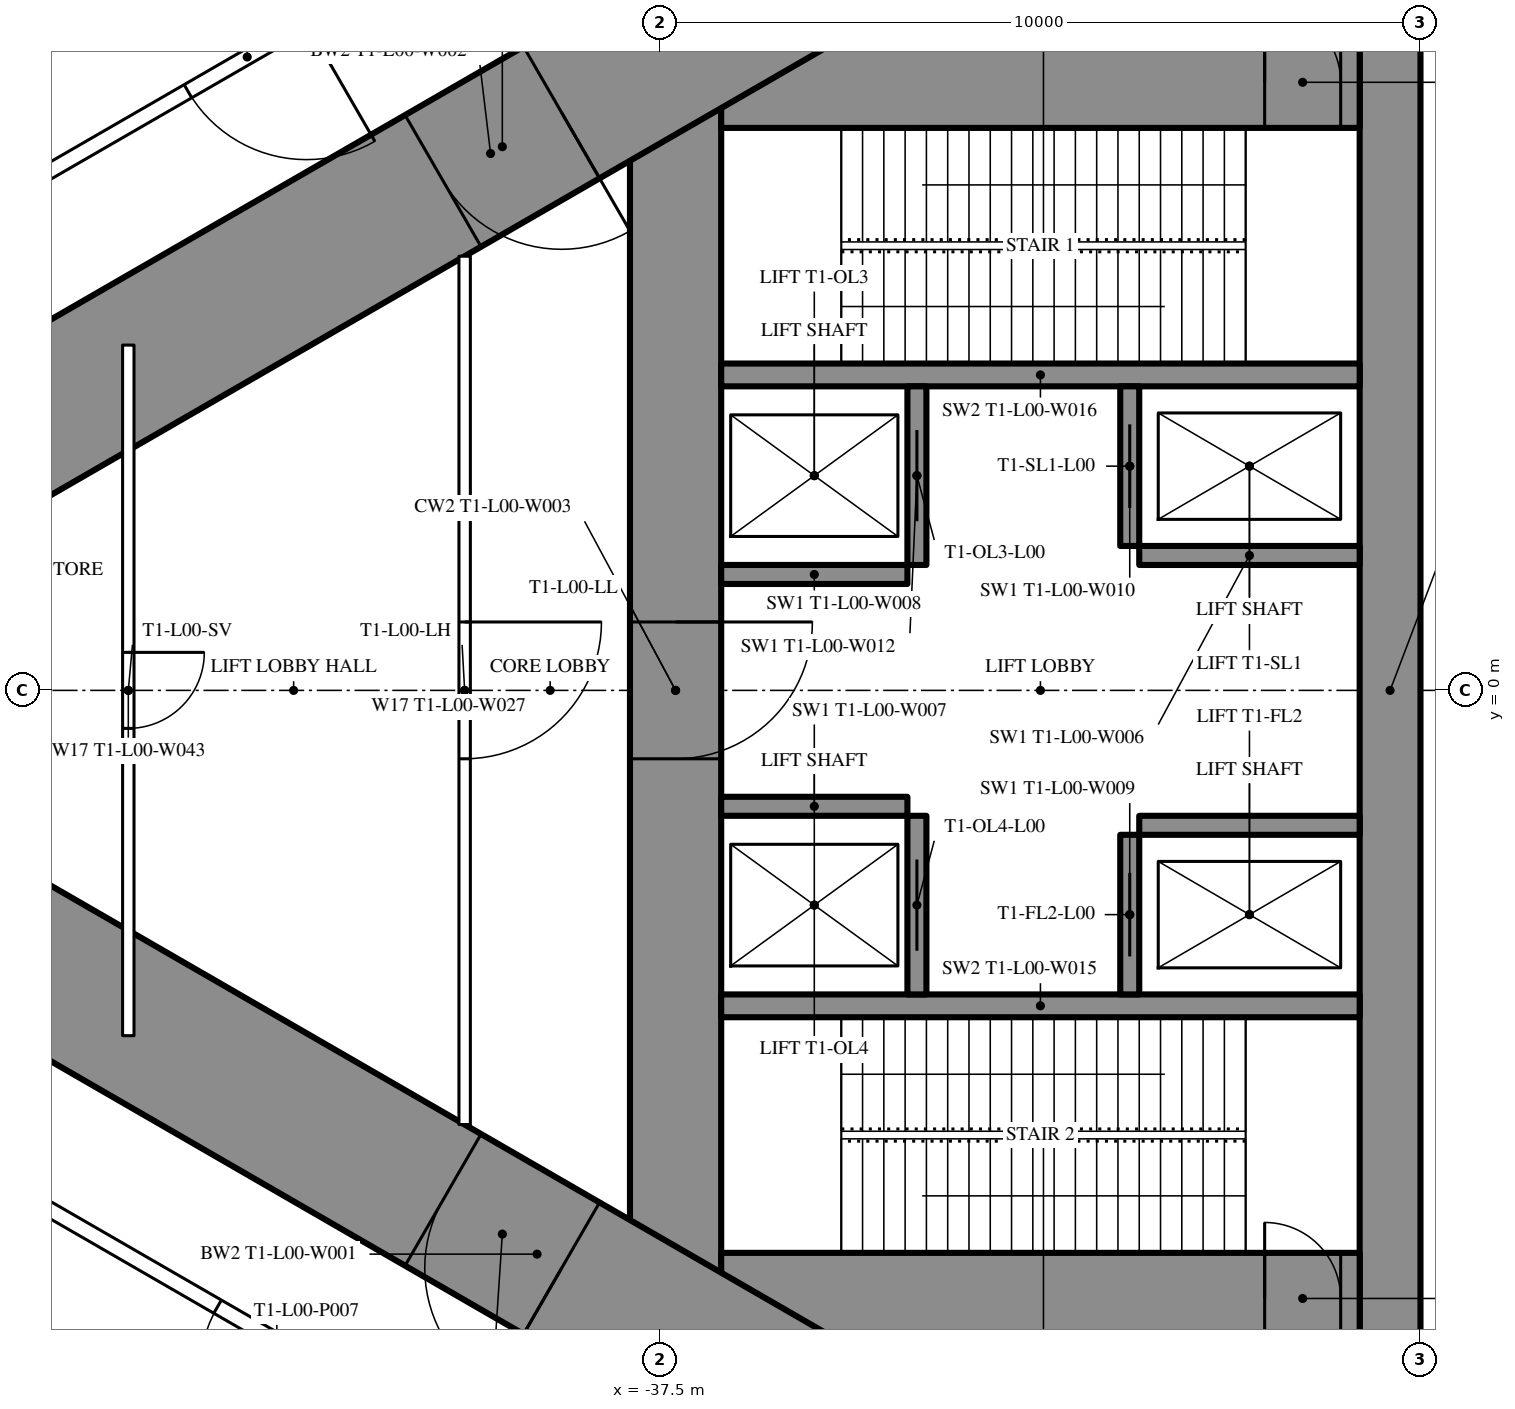
"""IFC4 building model, lengths in metres.
Left out: names, types, materials, properties, quantities, classifications, styles, units other than length and angle.
Written with IfcOpenShell. Run it as: python <this file> out.ifc"""

import sys

from ifc_helpers import new_model, si_unit, direction, frame, frame_2d, origin, place, context, subcontext, project, spatial, rectangle, extrude, element, fill, save


model = new_model("IFC4")
c1 = context("Model", 3, precision=1e-05, world=origin(), true_north=direction((0.0, 1.0)))
c2 = subcontext(c1, "Body", "Model", "MODEL_VIEW")
j1 = project(units=[si_unit("LENGTHUNIT", "METRE"), si_unit("PLANEANGLEUNIT", "RADIAN")], contexts=[c1])
p1 = place(None, origin())
s1 = spatial("IfcSite", under=j1, at=p1, CompositionType="ELEMENT")
p2 = place(p1, origin())
s2 = spatial("IfcBuilding", under=s1, at=p2, CompositionType="ELEMENT")
p3 = place(p2, origin())
s3 = spatial("IfcBuildingStorey", under=s2, at=p3, CompositionType="ELEMENT", Elevation=0.0)
p4 = place(p3, frame((-27.9, 8.6, 0.0), z_axis=(0.0, 0.0, 1.0), x_axis=(0.0, -1.0, 0.0)))
e1 = element("IfcWall", 1, at=p4, inside=s3, PredefinedType="SHEAR", context=c2, shape_type="SweptSolid", body=[
    extrude(rectangle(XDim=17.2, YDim=0.8, at=frame_2d((8.6, 0.0))), origin(), (0.0, 0.0, 1.0), 7.2),
])
p5 = place(p3, frame((-37.3, 8.6, 0.0), z_axis=(0.0, 0.0, 1.0), x_axis=(0.0, -1.0, 0.0)))
e2 = element("IfcWall", 2, at=p5, inside=s3, PredefinedType="SHEAR", context=c2, shape_type="SweptSolid", body=[
    extrude(rectangle(XDim=17.2, YDim=1.2, at=frame_2d((8.6, 0.0))), origin(), (0.0, 0.0, 1.0), 7.2),
])
p6 = place(p5, frame((7.7, 0.0, 0.0)))
e3 = element("IfcOpeningElement", 3, at=p6, cuts=e2, PredefinedType="OPENING", context=c2, shape_type="SweptSolid", body=[
    extrude(rectangle(XDim=1.8, YDim=2.2, at=frame_2d((0.9, 1.1))), frame((0.0, 0.61, 0.0), z_axis=(0.0, -1.0, 0.0), x_axis=(1.0, 0.0, 0.0)), (0.0, 0.0, 1.0), 1.22),
])
p7 = place(p3, frame((-28.3, 8.0, 0.0), z_axis=(0.0, 0.0, 1.0), x_axis=(-1.0, 0.0, 0.0)))
e4 = element("IfcWall", 4, at=p7, inside=s3, PredefinedType="SHEAR", context=c2, shape_type="SweptSolid", body=[
    extrude(rectangle(XDim=8.4, YDim=1.2, at=frame_2d((4.2, 0.0))), origin(), (0.0, 0.0, 1.0), 7.2),
])
p8 = place(p7, frame((0.25, 0.0, 0.0)))
e5 = element("IfcOpeningElement", 5, at=p8, cuts=e4, PredefinedType="OPENING", context=c2, shape_type="SweptSolid", body=[
    extrude(rectangle(XDim=1.0, YDim=2.2, at=frame_2d((0.5, 1.1))), frame((0.0, 0.61, 0.0), z_axis=(0.0, -1.0, 0.0), x_axis=(1.0, 0.0, 0.0)), (0.0, 0.0, 1.0), 1.22),
])
p9 = place(p3, frame((-28.3, -8.0, 0.0), z_axis=(0.0, 0.0, 1.0), x_axis=(-1.0, 0.0, 0.0)))
e6 = element("IfcWall", 6, at=p9, inside=s3, PredefinedType="SHEAR", context=c2, shape_type="SweptSolid", body=[
    extrude(rectangle(XDim=8.4, YDim=1.2, at=frame_2d((4.2, 0.0))), origin(), (0.0, 0.0, 1.0), 7.2),
])
p10 = place(p9, frame((0.25, 0.0, 0.0)))
e7 = element("IfcOpeningElement", 7, at=p10, cuts=e6, PredefinedType="OPENING", context=c2, shape_type="SweptSolid", body=[
    extrude(rectangle(XDim=1.0, YDim=2.2, at=frame_2d((0.5, 1.1))), frame((0.0, 0.61, 0.0), z_axis=(0.0, -1.0, 0.0), x_axis=(1.0, 0.0, 0.0)), (0.0, 0.0, 1.0), 1.22),
])
for number, where, z_axis, x_axis in (
    (8, (-28.3, 4.15, 0.0), (0.0, 0.0, 1.0), (-1.0, 0.0, 0.0)),
    (9, (-28.3, -4.15, 0.0), (0.0, 0.0, 1.0), (-1.0, 0.0, 0.0)),
):
    element("IfcWall", number, at=place(p3, frame(where, z_axis=z_axis, x_axis=x_axis)), inside=s3, PredefinedType="SHEAR", context=c2, shape_type="SweptSolid", body=[
        extrude(rectangle(XDim=8.4, YDim=0.3, at=frame_2d((4.2, 0.0))), origin(), (0.0, 0.0, 1.0), 7.2),
    ])
p11 = place(p3, frame((-31.325, 4.0, 0.0), z_axis=(0.0, 0.0, 1.0), x_axis=(0.0, -1.0, 0.0)))
e10 = element("IfcWall", 10, at=p11, inside=s3, PredefinedType="SHEAR", context=c2, shape_type="SweptSolid", body=[
    extrude(rectangle(XDim=2.1, YDim=0.25, at=frame_2d((1.05, 0.0))), origin(), (0.0, 0.0, 1.0), 7.2),
])
p12 = place(p11, frame((0.5, 0.0, 0.0)))
e11 = element("IfcOpeningElement", 11, at=p12, cuts=e10, PredefinedType="OPENING", context=c2, shape_type="SweptSolid", body=[
    extrude(rectangle(XDim=1.1, YDim=2.2, at=frame_2d((0.55, 1.1))), frame((0.0, 0.135, 0.0), z_axis=(0.0, -1.0, 0.0), x_axis=(1.0, 0.0, 0.0)), (0.0, 0.0, 1.0), 0.27),
])
p13 = place(p3, frame((-34.125, 4.0, 0.0), z_axis=(0.0, 0.0, 1.0), x_axis=(0.0, -1.0, 0.0)))
e12 = element("IfcWall", 12, at=p13, inside=s3, PredefinedType="SHEAR", context=c2, shape_type="SweptSolid", body=[
    extrude(rectangle(XDim=2.35, YDim=0.25, at=frame_2d((1.175, 0.0))), origin(), (0.0, 0.0, 1.0), 7.2),
])
p14 = place(p13, frame((0.575, 0.0, 0.0)))
e13 = element("IfcOpeningElement", 13, at=p14, cuts=e12, PredefinedType="OPENING", context=c2, shape_type="SweptSolid", body=[
    extrude(rectangle(XDim=1.2, YDim=2.2, at=frame_2d((0.6, 1.1))), frame((0.0, 0.135, 0.0), z_axis=(0.0, -1.0, 0.0), x_axis=(1.0, 0.0, 0.0)), (0.0, 0.0, 1.0), 0.27),
])
p15 = place(p3, frame((-28.3, 1.775, 0.0), z_axis=(0.0, 0.0, 1.0), x_axis=(-1.0, 0.0, 0.0)))
e14 = element("IfcWall", 14, at=p15, inside=s3, PredefinedType="SHEAR", context=c2, shape_type="SweptSolid", body=[
    extrude(rectangle(XDim=2.9, YDim=0.25, at=frame_2d((1.45, 0.0))), origin(), (0.0, 0.0, 1.0), 7.2),
])
p16 = place(p3, frame((-34.25, 1.525, 0.0), z_axis=(0.0, 0.0, 1.0), x_axis=(-1.0, 0.0, 0.0)))
e15 = element("IfcWall", 15, at=p16, inside=s3, PredefinedType="SHEAR", context=c2, shape_type="SweptSolid", body=[
    extrude(rectangle(XDim=2.45, YDim=0.25, at=frame_2d((1.225, 0.0))), origin(), (0.0, 0.0, 1.0), 7.2),
])
p17 = place(p3, frame((-31.325, -1.9, 0.0), z_axis=(0.0, 0.0, 1.0), x_axis=(0.0, -1.0, 0.0)))
e16 = element("IfcWall", 16, at=p17, inside=s3, PredefinedType="SHEAR", context=c2, shape_type="SweptSolid", body=[
    extrude(rectangle(XDim=2.1, YDim=0.25, at=frame_2d((1.05, 0.0))), origin(), (0.0, 0.0, 1.0), 7.2),
])
p18 = place(p17, frame((0.5, 0.0, 0.0)))
e17 = element("IfcOpeningElement", 17, at=p18, cuts=e16, PredefinedType="OPENING", context=c2, shape_type="SweptSolid", body=[
    extrude(rectangle(XDim=1.1, YDim=2.2, at=frame_2d((0.55, 1.1))), frame((0.0, 0.135, 0.0), z_axis=(0.0, -1.0, 0.0), x_axis=(1.0, 0.0, 0.0)), (0.0, 0.0, 1.0), 0.27),
])
p19 = place(p3, frame((-34.125, -1.65, 0.0), z_axis=(0.0, 0.0, 1.0), x_axis=(0.0, -1.0, 0.0)))
e18 = element("IfcWall", 18, at=p19, inside=s3, PredefinedType="SHEAR", context=c2, shape_type="SweptSolid", body=[
    extrude(rectangle(XDim=2.35, YDim=0.25, at=frame_2d((1.175, 0.0))), origin(), (0.0, 0.0, 1.0), 7.2),
])
p20 = place(p19, frame((0.575, 0.0, 0.0)))
e19 = element("IfcOpeningElement", 19, at=p20, cuts=e18, PredefinedType="OPENING", context=c2, shape_type="SweptSolid", body=[
    extrude(rectangle(XDim=1.2, YDim=2.2, at=frame_2d((0.6, 1.1))), frame((0.0, 0.135, 0.0), z_axis=(0.0, -1.0, 0.0), x_axis=(1.0, 0.0, 0.0)), (0.0, 0.0, 1.0), 0.27),
])
p21 = place(p3, frame((-28.3, -1.775, 0.0), z_axis=(0.0, 0.0, 1.0), x_axis=(-1.0, 0.0, 0.0)))
e20 = element("IfcWall", 20, at=p21, inside=s3, PredefinedType="SHEAR", context=c2, shape_type="SweptSolid", body=[
    extrude(rectangle(XDim=2.9, YDim=0.25, at=frame_2d((1.45, 0.0))), origin(), (0.0, 0.0, 1.0), 7.2),
])
p22 = place(p3, frame((-34.25, -1.525, 0.0), z_axis=(0.0, 0.0, 1.0), x_axis=(-1.0, 0.0, 0.0)))
e21 = element("IfcWall", 21, at=p22, inside=s3, PredefinedType="SHEAR", context=c2, shape_type="SweptSolid", body=[
    extrude(rectangle(XDim=2.45, YDim=0.25, at=frame_2d((1.225, 0.0))), origin(), (0.0, 0.0, 1.0), 7.2),
])
p23 = place(p3, frame((-27.2, 14.3, 0.0), z_axis=(0.0, 0.0, 1.0), x_axis=(-0.866026593062, -0.499997940104, 0.0)))
e22 = element("IfcWall", 22, at=p23, inside=s3, PredefinedType="SHEAR", context=c2, shape_type="SweptSolid", body=[
    extrude(rectangle(XDim=28.946, YDim=2.0, at=frame_2d((14.473, 0.0))), origin(), (0.0, 0.0, 1.0), 7.2),
])
p24 = place(p23, frame((4.6, 0.0, 0.0)))
e23 = element("IfcOpeningElement", 23, at=p24, cuts=e22, PredefinedType="OPENING", context=c2, shape_type="SweptSolid", body=[
    extrude(rectangle(XDim=1.0, YDim=2.2, at=frame_2d((0.5, 1.1))), frame((0.0, 1.01, 0.0), z_axis=(0.0, -1.0, 0.0), x_axis=(1.0, 0.0, 0.0)), (0.0, 0.0, 1.0), 2.02),
])
p25 = place(p23, frame((13.395, 0.0, 0.0)))
e24 = element("IfcOpeningElement", 24, at=p25, cuts=e22, PredefinedType="OPENING", context=c2, shape_type="SweptSolid", body=[
    extrude(rectangle(XDim=1.8, YDim=2.2, at=frame_2d((0.9, 1.1))), frame((0.0, 1.01, 0.0), z_axis=(0.0, -1.0, 0.0), x_axis=(1.0, 0.0, 0.0)), (0.0, 0.0, 1.0), 2.02),
])
p26 = place(p3, frame((-27.2, -14.3, 0.0), z_axis=(0.0, 0.0, 1.0), x_axis=(-0.866024044937, 0.500002353585, 0.0)))
e25 = element("IfcWall", 25, at=p26, inside=s3, PredefinedType="SHEAR", context=c2, shape_type="SweptSolid", body=[
    extrude(rectangle(XDim=27.533, YDim=2.0, at=frame_2d((13.767, 0.0))), origin(), (0.0, 0.0, 1.0), 7.2),
])
p27 = place(p26, frame((4.6, 0.0, 0.0)))
e26 = element("IfcOpeningElement", 26, at=p27, cuts=e25, PredefinedType="OPENING", context=c2, shape_type="SweptSolid", body=[
    extrude(rectangle(XDim=1.0, YDim=2.2, at=frame_2d((0.5, 1.1))), frame((0.0, 1.01, 0.0), z_axis=(0.0, -1.0, 0.0), x_axis=(1.0, 0.0, 0.0)), (0.0, 0.0, 1.0), 2.02),
])
p28 = place(p26, frame((13.395, 0.0, 0.0)))
e27 = element("IfcOpeningElement", 27, at=p28, cuts=e25, PredefinedType="OPENING", context=c2, shape_type="SweptSolid", body=[
    extrude(rectangle(XDim=1.8, YDim=2.2, at=frame_2d((0.9, 1.1))), frame((0.0, 1.01, 0.0), z_axis=(0.0, -1.0, 0.0), x_axis=(1.0, 0.0, 0.0)), (0.0, 0.0, 1.0), 2.02),
])
p29 = place(p3, frame((-37.9, 11.24, 0.0), z_axis=(0.0, 0.0, 1.0), x_axis=(-0.866022995118, -0.50000417191, 0.0)))
e28 = element("IfcWall", 28, at=p29, inside=s3, PredefinedType="PARTITIONING", context=c2, shape_type="SweptSolid", body=[
    extrude(rectangle(XDim=22.48, YDim=0.2, at=frame_2d((11.24, 0.0))), origin(), (0.0, 0.0, 1.0), 6.85),
])
p30 = place(p29, frame((14.644, 0.0, 0.0)))
e29 = element("IfcOpeningElement", 29, at=p30, cuts=e28, PredefinedType="OPENING", context=c2, shape_type="SweptSolid", body=[
    extrude(rectangle(XDim=1.8, YDim=2.2, at=frame_2d((0.9, 1.1))), frame((0.0, 0.11, 0.0), z_axis=(0.0, -1.0, 0.0), x_axis=(1.0, 0.0, 0.0)), (0.0, 0.0, 1.0), 0.22),
])
p31 = place(p29, frame((20.069, 0.0, 0.0)))
e30 = element("IfcOpeningElement", 30, at=p31, cuts=e28, PredefinedType="OPENING", context=c2, shape_type="SweptSolid", body=[
    extrude(rectangle(XDim=1.8, YDim=2.2, at=frame_2d((0.9, 1.1))), frame((0.0, 0.11, 0.0), z_axis=(0.0, -1.0, 0.0), x_axis=(1.0, 0.0, 0.0)), (0.0, 0.0, 1.0), 0.22),
])
p32 = place(p29, frame((4.915, 0.0, 0.0)))
e31 = element("IfcOpeningElement", 31, at=p32, cuts=e28, PredefinedType="OPENING", context=c2, shape_type="SweptSolid", body=[
    extrude(rectangle(XDim=1.8, YDim=2.2, at=frame_2d((0.9, 1.1))), frame((0.0, 0.11, 0.0), z_axis=(0.0, -1.0, 0.0), x_axis=(1.0, 0.0, 0.0)), (0.0, 0.0, 1.0), 0.22),
])
p33 = place(p3, frame((-37.12, -11.69, 0.0), z_axis=(0.0, 0.0, 1.0), x_axis=(-0.866028803602, 0.499994111297, 0.0)))
e32 = element("IfcWall", 32, at=p33, inside=s3, PredefinedType="PARTITIONING", context=c2, shape_type="SweptSolid", body=[
    extrude(rectangle(XDim=23.26, YDim=0.2, at=frame_2d((11.63, 0.0))), origin(), (0.0, 0.0, 1.0), 6.85),
])
p34 = place(p33, frame((20.909, 0.0, 0.0)))
e33 = element("IfcOpeningElement", 33, at=p34, cuts=e32, PredefinedType="OPENING", context=c2, shape_type="SweptSolid", body=[
    extrude(rectangle(XDim=1.8, YDim=2.2, at=frame_2d((0.9, 1.1))), frame((0.0, 0.11, 0.0), z_axis=(0.0, -1.0, 0.0), x_axis=(1.0, 0.0, 0.0)), (0.0, 0.0, 1.0), 0.22),
])
p35 = place(p33, frame((15.444, 0.0, 0.0)))
e34 = element("IfcOpeningElement", 34, at=p35, cuts=e32, PredefinedType="OPENING", context=c2, shape_type="SweptSolid", body=[
    extrude(rectangle(XDim=2.0, YDim=2.4, at=frame_2d((1.0, 1.2))), frame((0.0, 0.11, 0.0), z_axis=(0.0, -1.0, 0.0), x_axis=(1.0, 0.0, 0.0)), (0.0, 0.0, 1.0), 0.22),
])
p36 = place(p33, frame((5.365, 0.0, 0.0)))
e35 = element("IfcOpeningElement", 35, at=p36, cuts=e32, PredefinedType="OPENING", context=c2, shape_type="SweptSolid", body=[
    extrude(rectangle(XDim=1.8, YDim=2.2, at=frame_2d((0.9, 1.1))), frame((0.0, 0.11, 0.0), z_axis=(0.0, -1.0, 0.0), x_axis=(1.0, 0.0, 0.0)), (0.0, 0.0, 1.0), 0.22),
])
p37 = place(p3, frame((-40.075, 5.712, 0.0), z_axis=(0.0, 0.0, 1.0), x_axis=(0.0, -1.0, 0.0)))
e36 = element("IfcWall", 36, at=p37, inside=s3, PredefinedType="PARTITIONING", context=c2, shape_type="SweptSolid", body=[
    extrude(rectangle(XDim=11.424, YDim=0.15, at=frame_2d((5.712, 0.0))), origin(), (0.0, 0.0, 1.0), 6.85),
])
p38 = place(p37, frame((4.812, 0.0, 0.0)))
e37 = element("IfcOpeningElement", 37, at=p38, cuts=e36, PredefinedType="OPENING", context=c2, shape_type="SweptSolid", body=[
    extrude(rectangle(XDim=1.8, YDim=2.2, at=frame_2d((0.9, 1.1))), frame((0.0, 0.085, 0.0), z_axis=(0.0, -1.0, 0.0), x_axis=(1.0, 0.0, 0.0)), (0.0, 0.0, 1.0), 0.17),
])
p39 = place(p3, frame((-44.5, 4.543, 0.0), z_axis=(0.0, 0.0, 1.0), x_axis=(0.0, -1.0, 0.0)))
e38 = element("IfcWall", 38, at=p39, inside=s3, PredefinedType="PARTITIONING", context=c2, shape_type="SweptSolid", body=[
    extrude(rectangle(XDim=9.085, YDim=0.15, at=frame_2d((4.543, 0.0))), origin(), (0.0, 0.0, 1.0), 6.85),
])
p40 = place(p39, frame((4.043, 0.0, 0.0)))
e39 = element("IfcOpeningElement", 39, at=p40, cuts=e38, PredefinedType="OPENING", context=c2, shape_type="SweptSolid", body=[
    extrude(rectangle(XDim=1.0, YDim=2.2, at=frame_2d((0.5, 1.1))), frame((0.0, 0.085, 0.0), z_axis=(0.0, -1.0, 0.0), x_axis=(1.0, 0.0, 0.0)), (0.0, 0.0, 1.0), 0.17),
])
p41 = place(p3, frame((-27.5, -4.95, 0.0), z_axis=(0.0, 0.0, 1.0), x_axis=(1.0, 0.0, 0.0)))
e40 = element("IfcWall", 40, at=p41, inside=s3, PredefinedType="PARTITIONING", context=c2, shape_type="SweptSolid", body=[
    extrude(rectangle(XDim=22.875, YDim=0.15, at=frame_2d((11.438, 0.0))), origin(), (0.0, 0.0, 1.0), 5.85),
])
p42 = place(p41, frame((9.1, 0.0, 0.0)))
e41 = element("IfcOpeningElement", 41, at=p42, cuts=e40, PredefinedType="OPENING", context=c2, shape_type="SweptSolid", body=[
    extrude(rectangle(XDim=1.8, YDim=2.2, at=frame_2d((0.9, 1.1))), frame((0.0, 0.085, 0.0), z_axis=(0.0, -1.0, 0.0), x_axis=(1.0, 0.0, 0.0)), (0.0, 0.0, 1.0), 0.17),
])
p43 = place(p36, origin())
e42 = element("IfcDoor", 42, at=p43, inside=s3, OperationType="DOUBLE_DOOR_SINGLE_SWING", PredefinedType="DOOR", context=c2, shape_type="SweptSolid", body=[
    extrude(rectangle(XDim=1.8, YDim=2.2, at=frame_2d((0.9, 1.1))), frame((0.0, 0.025, 0.0), z_axis=(0.0, -1.0, 0.0), x_axis=(1.0, 0.0, 0.0)), (0.0, 0.0, 1.0), 0.05),
])
fill(e35, e42)
p44 = place(p32, origin())
e43 = element("IfcDoor", 43, at=p44, inside=s3, OperationType="DOUBLE_DOOR_SINGLE_SWING", PredefinedType="DOOR", context=c2, shape_type="SweptSolid", body=[
    extrude(rectangle(XDim=1.8, YDim=2.2, at=frame_2d((0.9, 1.1))), frame((0.0, 0.025, 0.0), z_axis=(0.0, -1.0, 0.0), x_axis=(1.0, 0.0, 0.0)), (0.0, 0.0, 1.0), 0.05),
])
fill(e31, e43)
p45 = place(p38, origin())
e44 = element("IfcDoor", 44, at=p45, inside=s3, OperationType="DOUBLE_DOOR_SINGLE_SWING", PredefinedType="DOOR", context=c2, shape_type="SweptSolid", body=[
    extrude(rectangle(XDim=1.8, YDim=2.2, at=frame_2d((0.9, 1.1))), frame((0.0, 0.025, 0.0), z_axis=(0.0, -1.0, 0.0), x_axis=(1.0, 0.0, 0.0)), (0.0, 0.0, 1.0), 0.05),
])
fill(e37, e44)
p46 = place(p40, origin())
e45 = element("IfcDoor", 45, at=p46, inside=s3, OperationType="SINGLE_SWING_LEFT", PredefinedType="DOOR", context=c2, shape_type="SweptSolid", body=[
    extrude(rectangle(XDim=1.0, YDim=2.2, at=frame_2d((0.5, 1.1))), frame((0.0, 0.025, 0.0), z_axis=(0.0, -1.0, 0.0), x_axis=(1.0, 0.0, 0.0)), (0.0, 0.0, 1.0), 0.05),
])
fill(e39, e45)
p47 = place(p25, origin())
e46 = element("IfcDoor", 46, at=p47, inside=s3, OperationType="DOUBLE_DOOR_SINGLE_SWING", PredefinedType="DOOR", context=c2, shape_type="SweptSolid", body=[
    extrude(rectangle(XDim=1.8, YDim=2.2, at=frame_2d((0.9, 1.1))), frame((0.0, 0.025, 0.0), z_axis=(0.0, -1.0, 0.0), x_axis=(1.0, 0.0, 0.0)), (0.0, 0.0, 1.0), 0.05),
])
fill(e24, e46)
p48 = place(p28, origin())
e47 = element("IfcDoor", 47, at=p48, inside=s3, OperationType="DOUBLE_DOOR_SINGLE_SWING", PredefinedType="DOOR", context=c2, shape_type="SweptSolid", body=[
    extrude(rectangle(XDim=1.8, YDim=2.2, at=frame_2d((0.9, 1.1))), frame((0.0, 0.025, 0.0), z_axis=(0.0, -1.0, 0.0), x_axis=(1.0, 0.0, 0.0)), (0.0, 0.0, 1.0), 0.05),
])
fill(e27, e47)
p49 = place(p6, origin())
e48 = element("IfcDoor", 48, at=p49, inside=s3, OperationType="DOUBLE_DOOR_SINGLE_SWING", PredefinedType="DOOR", context=c2, shape_type="SweptSolid", body=[
    extrude(rectangle(XDim=1.8, YDim=2.2, at=frame_2d((0.9, 1.1))), frame((0.0, 0.025, 0.0), z_axis=(0.0, -1.0, 0.0), x_axis=(1.0, 0.0, 0.0)), (0.0, 0.0, 1.0), 0.05),
])
fill(e3, e48)
p50 = place(p8, origin())
e49 = element("IfcDoor", 49, at=p50, inside=s3, OperationType="SINGLE_SWING_RIGHT", PredefinedType="DOOR", context=c2, shape_type="SweptSolid", body=[
    extrude(rectangle(XDim=1.0, YDim=2.2, at=frame_2d((0.5, 1.1))), frame((0.0, 0.025, 0.0), z_axis=(0.0, -1.0, 0.0), x_axis=(1.0, 0.0, 0.0)), (0.0, 0.0, 1.0), 0.05),
])
fill(e5, e49)
p51 = place(p10, origin())
e50 = element("IfcDoor", 50, at=p51, inside=s3, OperationType="SINGLE_SWING_RIGHT", PredefinedType="DOOR", context=c2, shape_type="SweptSolid", body=[
    extrude(rectangle(XDim=1.0, YDim=2.2, at=frame_2d((0.5, 1.1))), frame((0.0, 0.025, 0.0), z_axis=(0.0, -1.0, 0.0), x_axis=(1.0, 0.0, 0.0)), (0.0, 0.0, 1.0), 0.05),
])
fill(e7, e50)
p52 = place(p12, origin())
e51 = element("IfcDoor", 51, at=p52, inside=s3, OperationType="SLIDING_TO_LEFT", PredefinedType="USERDEFINED", context=c2, shape_type="SweptSolid", body=[
    extrude(rectangle(XDim=1.1, YDim=2.2, at=frame_2d((0.55, 1.1))), frame((0.0, 0.025, 0.0), z_axis=(0.0, -1.0, 0.0), x_axis=(1.0, 0.0, 0.0)), (0.0, 0.0, 1.0), 0.05),
])
fill(e11, e51)
p53 = place(p18, origin())
e52 = element("IfcDoor", 52, at=p53, inside=s3, OperationType="SLIDING_TO_LEFT", PredefinedType="USERDEFINED", context=c2, shape_type="SweptSolid", body=[
    extrude(rectangle(XDim=1.1, YDim=2.2, at=frame_2d((0.55, 1.1))), frame((0.0, 0.025, 0.0), z_axis=(0.0, -1.0, 0.0), x_axis=(1.0, 0.0, 0.0)), (0.0, 0.0, 1.0), 0.05),
])
fill(e17, e52)
p54 = place(p14, origin())
e53 = element("IfcDoor", 53, at=p54, inside=s3, OperationType="DOUBLE_DOOR_SLIDING", PredefinedType="USERDEFINED", context=c2, shape_type="SweptSolid", body=[
    extrude(rectangle(XDim=1.2, YDim=2.2, at=frame_2d((0.6, 1.1))), frame((0.0, 0.025, 0.0), z_axis=(0.0, -1.0, 0.0), x_axis=(1.0, 0.0, 0.0)), (0.0, 0.0, 1.0), 0.05),
])
fill(e13, e53)
p55 = place(p20, origin())
e54 = element("IfcDoor", 54, at=p55, inside=s3, OperationType="DOUBLE_DOOR_SLIDING", PredefinedType="USERDEFINED", context=c2, shape_type="SweptSolid", body=[
    extrude(rectangle(XDim=1.2, YDim=2.2, at=frame_2d((0.6, 1.1))), frame((0.0, 0.025, 0.0), z_axis=(0.0, -1.0, 0.0), x_axis=(1.0, 0.0, 0.0)), (0.0, 0.0, 1.0), 0.05),
])
fill(e19, e54)
save(model, sys.argv[1])
